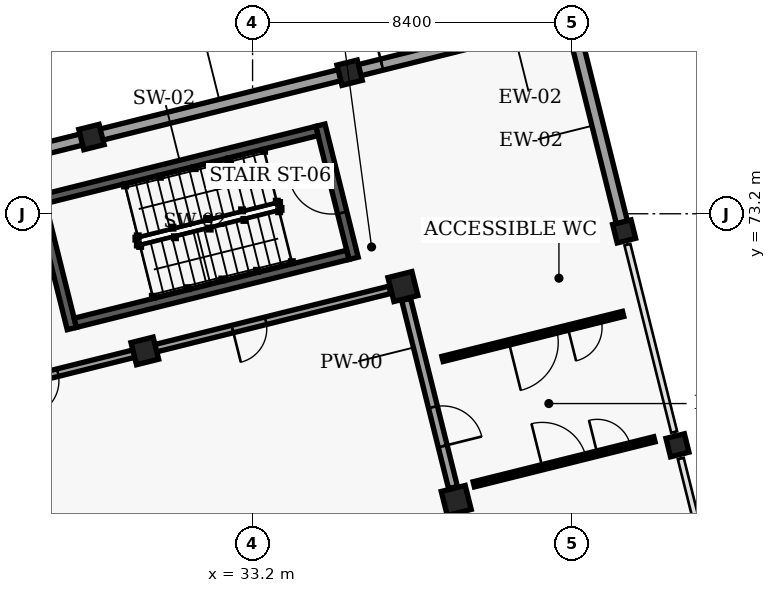
"""IFC4 building model, lengths in metres.
Left out: names, types, materials, properties, quantities, classifications, styles, units other than length and angle.
Written with IfcOpenShell. Run it as: python <this file> out.ifc"""

import sys

from ifc_helpers import new_model, si_unit, direction, frame, frame_2d, origin, origin_2d, place, context, subcontext, project, spatial, rectangle, extrude, element, fill, save


model = new_model("IFC4")
c1 = context("Model", 3, precision=1e-05, world=origin(), true_north=direction((0.0, 1.0)))
c2 = subcontext(c1, "Body", "Model", "MODEL_VIEW")
j1 = project(units=[si_unit("LENGTHUNIT", "METRE"), si_unit("PLANEANGLEUNIT", "RADIAN")], contexts=[c1])
p1 = place(None, origin())
s1 = spatial("IfcSite", under=j1, at=p1, CompositionType="ELEMENT")
p2 = place(p1, origin())
s2 = spatial("IfcBuilding", under=s1, at=p2, CompositionType="ELEMENT")
p3 = place(p2, origin())
s3 = spatial("IfcBuildingStorey", under=s2, at=p3, CompositionType="ELEMENT", Elevation=0.0)
for number, where, z_axis, x_axis in (
    (1, (38.559, 65.657, 0.0), (0.0, 0.0, 1.0), (0.97, 0.242, 0.0)),
    (2, (37.156, 71.285, 0.0), (0.0, 0.0, 1.0), (0.97, 0.242, 0.0)),
):
    element("IfcColumn", number, at=place(p3, frame(where, z_axis=z_axis, x_axis=x_axis)), inside=s3, PredefinedType="COLUMN", context=c2, shape_type="SweptSolid", body=[
        extrude(rectangle(XDim=0.65, YDim=0.65, at=origin_2d()), origin(), (0.0, 0.0, 1.0), 4.8),
    ])
for number, where, z_axis, x_axis in (
    (3, (44.381, 67.108, 0.0), (0.0, 0.0, 1.0), (0.97, 0.242, 0.0)),
    (4, (42.977, 72.736, 0.0), (0.0, 0.0, 1.0), (0.97, 0.242, 0.0)),
):
    element("IfcColumn", number, at=place(p3, frame(where, z_axis=z_axis, x_axis=x_axis)), inside=s3, PredefinedType="COLUMN", context=c2, shape_type="SweptSolid", body=[
        extrude(rectangle(XDim=0.5, YDim=0.5, at=origin_2d()), origin(), (0.0, 0.0, 1.0), 4.8),
    ])
p4 = place(p3, frame((30.364, 69.591, 0.0), z_axis=(0.0, 0.0, 1.0), x_axis=(0.970295726276, 0.2419218956, 0.0)))
e5 = element("IfcColumn", 5, at=p4, inside=s3, PredefinedType="COLUMN", context=c2, shape_type="SweptSolid", body=[
    extrude(rectangle(XDim=0.6, YDim=0.6, at=origin_2d()), origin(), (0.0, 0.0, 1.0), 4.8),
])
for number, where, z_axis, x_axis in (
    (6, (28.96, 75.219, 0.0), (0.0, 0.0, 1.0), (0.97, 0.242, 0.0)),
    (7, (35.753, 76.912, 0.0), (0.0, 0.0, 1.0), (0.97, 0.242, 0.0)),
):
    element("IfcColumn", number, at=place(p3, frame(where, z_axis=z_axis, x_axis=x_axis)), inside=s3, PredefinedType="COLUMN", context=c2, shape_type="SweptSolid", body=[
        extrude(rectangle(XDim=0.55, YDim=0.55, at=origin_2d()), origin(), (0.0, 0.0, 1.0), 4.8),
    ])
p5 = place(p3, frame((42.958, 72.814, 0.0), z_axis=(0.0, 0.0, 1.0), x_axis=(-0.242036480393, 0.970267149892, 0.0)))
e8 = element("IfcWall", 8, at=p5, inside=s3, PredefinedType="SOLIDWALL", context=c2, shape_type="SweptSolid", body=[
    extrude(rectangle(XDim=5.64, YDim=0.3, at=frame_2d((2.82, 0.0))), origin(), (0.0, 0.0, 1.0), 4.095),
])
p6 = place(p3, frame((22.265, 73.55, 0.0), z_axis=(0.0, 0.0, 1.0), x_axis=(0.970298579828, 0.24191045034, 0.0)))
e9 = element("IfcWall", 9, at=p6, inside=s3, PredefinedType="SOLIDWALL", context=c2, shape_type="SweptSolid", body=[
    extrude(rectangle(XDim=6.8, YDim=0.3, at=frame_2d((3.4, 0.0))), origin(), (0.0, 0.0, 1.0), 4.065),
])
p7 = place(p3, frame((29.058, 75.243, 0.0), z_axis=(0.0, 0.0, 1.0), x_axis=(0.970296478685, 0.241918877831, 0.0)))
e10 = element("IfcWall", 10, at=p7, inside=s3, PredefinedType="SOLIDWALL", context=c2, shape_type="SweptSolid", body=[
    extrude(rectangle(XDim=6.8, YDim=0.3, at=frame_2d((3.4, 0.0))), origin(), (0.0, 0.0, 1.0), 4.065),
])
p8 = place(p3, frame((35.85, 76.937, 0.0), z_axis=(0.0, 0.0, 1.0), x_axis=(0.97029090175, 0.241941244896, 0.0)))
e11 = element("IfcWall", 11, at=p8, inside=s3, PredefinedType="SOLIDWALL", context=c2, shape_type="SweptSolid", body=[
    extrude(rectangle(XDim=5.799, YDim=0.3, at=frame_2d((2.9, 0.0))), origin(), (0.0, 0.0, 1.0), 4.065),
])
p9 = place(p8, frame((0.775, 0.0, 0.0)))
e12 = element("IfcOpeningElement", 12, at=p9, cuts=e11, PredefinedType="OPENING", context=c2, shape_type="SweptSolid", body=[
    extrude(rectangle(XDim=2.05, YDim=2.32, at=frame_2d((1.025, 1.16))), frame((0.0, 0.16, 0.0), z_axis=(0.0, -1.0, 0.0), x_axis=(1.0, 0.0, 0.0)), (0.0, 0.0, 1.0), 0.32),
])
p10 = place(p3, frame((34.984, 75.531, 0.0), z_axis=(0.0, 0.0, 1.0), x_axis=(0.242090083699, -0.97025377679, 0.0)))
e13 = element("IfcWall", 13, at=p10, inside=s3, PredefinedType="SHEAR", context=c2, shape_type="SweptSolid", body=[
    extrude(rectangle(XDim=3.61, YDim=0.25, at=frame_2d((1.805, 0.0))), origin(), (0.0, 0.0, 1.0), 4.56),
])
p11 = place(p10, frame((1.235, 0.0, 0.0)))
e14 = element("IfcOpeningElement", 14, at=p11, cuts=e13, PredefinedType="OPENING", context=c2, shape_type="SweptSolid", body=[
    extrude(rectangle(XDim=1.14, YDim=2.15, at=frame_2d((0.57, 1.075))), frame((0.0, 0.135, 0.0), z_axis=(0.0, -1.0, 0.0), x_axis=(1.0, 0.0, 0.0)), (0.0, 0.0, 1.0), 0.27),
])
p12 = place(p3, frame((28.444, 70.18, 0.0), z_axis=(0.0, 0.0, 1.0), x_axis=(-0.241898912952, 0.970301456204, 0.0)))
e15 = element("IfcWall", 15, at=p12, inside=s3, PredefinedType="SHEAR", context=c2, shape_type="SweptSolid", body=[
    extrude(rectangle(XDim=3.609, YDim=0.25, at=frame_2d((1.805, 0.0))), origin(), (0.0, 0.0, 1.0), 4.56),
])
p13 = place(p3, frame((35.706, 72.119, 0.0), z_axis=(0.0, 0.0, 1.0), x_axis=(-0.970299691856, -0.241905989972, 0.0)))
e16 = element("IfcWall", 16, at=p13, inside=s3, PredefinedType="SHEAR", context=c2, shape_type="SweptSolid", body=[
    extrude(rectangle(XDim=7.391, YDim=0.25, at=frame_2d((3.695, 0.0))), origin(), (0.0, 0.0, 1.0), 4.56),
])
p14 = place(p3, frame((27.723, 73.591, 0.0), z_axis=(0.0, 0.0, 1.0), x_axis=(0.970291958031, 0.241937008705, 0.0)))
e17 = element("IfcWall", 17, at=p14, inside=s3, PredefinedType="SHEAR", context=c2, shape_type="SweptSolid", body=[
    extrude(rectangle(XDim=7.39, YDim=0.25, at=frame_2d((3.695, 0.0))), origin(), (0.0, 0.0, 1.0), 4.56),
])
p15 = place(p3, frame((41.28, 54.742, 0.0), z_axis=(0.0, 0.0, 1.0), x_axis=(-0.241866165603, 0.970309619625, 0.0)))
e18 = element("IfcWall", 18, at=p15, inside=s3, PredefinedType="PARTITIONING", context=c2, shape_type="SweptSolid", body=[
    extrude(rectangle(XDim=10.898, YDim=0.24, at=frame_2d((5.449, 0.0))), origin(), (0.0, 0.0, 1.0), 4.006),
])
p16 = place(p15, frame((3.539, 0.0, 0.0)))
e19 = element("IfcOpeningElement", 19, at=p16, cuts=e18, PredefinedType="OPENING", context=c2, shape_type="SweptSolid", body=[
    extrude(rectangle(XDim=1.12, YDim=2.16, at=frame_2d((0.56, 1.08))), frame((0.0, 0.13, 0.0), z_axis=(0.0, -1.0, 0.0), x_axis=(1.0, 0.0, 0.0)), (0.0, 0.0, 1.0), 0.26),
])
p17 = place(p3, frame((38.474, 65.997, 0.0), z_axis=(0.0, 0.0, 1.0), x_axis=(-0.241825856576, 0.970319666446, 0.0)))
e20 = element("IfcWall", 20, at=p17, inside=s3, PredefinedType="PARTITIONING", context=c2, shape_type="SweptSolid", body=[
    extrude(rectangle(XDim=5.099, YDim=0.24, at=frame_2d((2.55, 0.0))), origin(), (0.0, 0.0, 1.0), 3.845),
])
p18 = place(p17, frame((1.12, 0.0, 0.0)))
e21 = element("IfcOpeningElement", 21, at=p18, cuts=e20, PredefinedType="OPENING", context=c2, shape_type="SweptSolid", body=[
    extrude(rectangle(XDim=1.06, YDim=2.16, at=frame_2d((0.53, 1.08))), frame((0.0, 0.13, 0.0), z_axis=(0.0, -1.0, 0.0), x_axis=(1.0, 0.0, 0.0)), (0.0, 0.0, 1.0), 0.26),
])
p19 = place(p3, frame((17.119, 66.289, 0.0), z_axis=(0.0, 0.0, 1.0), x_axis=(0.970297233618, 0.241915849902, 0.0)))
e22 = element("IfcWall", 22, at=p19, inside=s3, PredefinedType="PARTITIONING", context=c2, shape_type="SweptSolid", body=[
    extrude(rectangle(XDim=20.3, YDim=0.2, at=frame_2d((10.15, 0.0))), origin(), (0.0, 0.0, 1.0), 3.845),
])
p20 = place(p19, frame((7.192, 0.0, 0.0)))
e23 = element("IfcOpeningElement", 23, at=p20, cuts=e22, PredefinedType="OPENING", context=c2, shape_type="SweptSolid", body=[
    extrude(rectangle(XDim=0.95, YDim=2.12, at=frame_2d((0.475, 1.06))), frame((0.0, 0.11, 0.0), z_axis=(0.0, -1.0, 0.0), x_axis=(1.0, 0.0, 0.0)), (0.0, 0.0, 1.0), 0.22),
])
p21 = place(p19, frame((10.373, 0.0, 0.0)))
e24 = element("IfcOpeningElement", 24, at=p21, cuts=e22, PredefinedType="OPENING", context=c2, shape_type="SweptSolid", body=[
    extrude(rectangle(XDim=0.92, YDim=2.1, at=frame_2d((0.46, 1.05))), frame((0.0, 0.11, 0.0), z_axis=(0.0, -1.0, 0.0), x_axis=(1.0, 0.0, 0.0)), (0.0, 0.0, 1.0), 0.22),
])
p22 = place(p19, frame((5.12, 0.0, 0.0)))
e25 = element("IfcOpeningElement", 25, at=p22, cuts=e22, PredefinedType="OPENING", context=c2, shape_type="SweptSolid", body=[
    extrude(rectangle(XDim=0.9, YDim=2.06, at=frame_2d((0.45, 1.03))), frame((0.0, 0.11, 0.0), z_axis=(0.0, -1.0, 0.0), x_axis=(1.0, 0.0, 0.0)), (0.0, 0.0, 1.0), 0.22),
])
p23 = place(p19, frame((16.03, 0.0, 0.0)))
e26 = element("IfcOpeningElement", 26, at=p23, cuts=e22, PredefinedType="OPENING", context=c2, shape_type="SweptSolid", body=[
    extrude(rectangle(XDim=0.9, YDim=2.06, at=frame_2d((0.45, 1.03))), frame((0.0, 0.11, 0.0), z_axis=(0.0, -1.0, 0.0), x_axis=(1.0, 0.0, 0.0)), (0.0, 0.0, 1.0), 0.22),
])
p24 = place(p3, frame((39.02, 66.081, 0.0), z_axis=(0.0, 0.0, 1.0), x_axis=(0.970306426655, 0.241878974681, 0.0)))
e27 = element("IfcWall", 27, at=p24, inside=s3, PredefinedType="PARTITIONING", context=c2, shape_type="SweptSolid", body=[
    extrude(rectangle(XDim=4.899, YDim=0.14, at=frame_2d((2.45, 0.0))), origin(), (0.0, 0.0, 1.0), 4.187),
])
p25 = place(p24, frame((1.86, 0.0, 0.0)))
e28 = element("IfcOpeningElement", 28, at=p25, cuts=e27, PredefinedType="OPENING", context=c2, shape_type="SweptSolid", body=[
    extrude(rectangle(XDim=1.18, YDim=2.18, at=frame_2d((0.59, 1.09))), frame((0.0, 0.08, 0.0), z_axis=(0.0, -1.0, 0.0), x_axis=(1.0, 0.0, 0.0)), (0.0, 0.0, 1.0), 0.16),
])
p26 = place(p24, frame((3.35, 0.0, 0.0)))
e29 = element("IfcOpeningElement", 29, at=p26, cuts=e27, PredefinedType="OPENING", context=c2, shape_type="SweptSolid", body=[
    extrude(rectangle(XDim=0.9, YDim=2.06, at=frame_2d((0.45, 1.03))), frame((0.0, 0.08, 0.0), z_axis=(0.0, -1.0, 0.0), x_axis=(1.0, 0.0, 0.0)), (0.0, 0.0, 1.0), 0.16),
])
p27 = place(p3, frame((38.198, 69.38, 0.0), z_axis=(0.0, 0.0, 1.0), x_axis=(0.970294761766, 0.241925764003, 0.0)))
e30 = element("IfcWall", 30, at=p27, inside=s3, PredefinedType="PARTITIONING", context=c2, shape_type="SweptSolid", body=[
    extrude(rectangle(XDim=4.898, YDim=0.14, at=frame_2d((2.449, 0.0))), origin(), (0.0, 0.0, 1.0), 4.187),
])
p28 = place(p27, frame((1.799, 0.0, 0.0)))
e31 = element("IfcOpeningElement", 31, at=p28, cuts=e30, PredefinedType="OPENING", context=c2, shape_type="SweptSolid", body=[
    extrude(rectangle(XDim=1.3, YDim=2.2, at=frame_2d((0.65, 1.1))), frame((0.0, 0.08, 0.0), z_axis=(0.0, -1.0, 0.0), x_axis=(1.0, 0.0, 0.0)), (0.0, 0.0, 1.0), 0.16),
])
p29 = place(p27, frame((3.399, 0.0, 0.0)))
e32 = element("IfcOpeningElement", 32, at=p29, cuts=e30, PredefinedType="OPENING", context=c2, shape_type="SweptSolid", body=[
    extrude(rectangle(XDim=0.9, YDim=2.06, at=frame_2d((0.45, 1.03))), frame((0.0, 0.08, 0.0), z_axis=(0.0, -1.0, 0.0), x_axis=(1.0, 0.0, 0.0)), (0.0, 0.0, 1.0), 0.16),
])
p30 = place(p11, origin())
e33 = element("IfcDoor", 33, at=p30, inside=s3, OperationType="SINGLE_SWING_RIGHT", PredefinedType="DOOR", context=c2, shape_type="SweptSolid", body=[
    extrude(rectangle(XDim=1.14, YDim=2.15, at=frame_2d((0.57, 1.075))), frame((0.0, 0.025, 0.0), z_axis=(0.0, -1.0, 0.0), x_axis=(1.0, 0.0, 0.0)), (0.0, 0.0, 1.0), 0.05),
])
fill(e14, e33)
p31 = place(p9, origin())
e34 = element("IfcDoor", 34, at=p31, inside=s3, OperationType="DOUBLE_DOOR_SINGLE_SWING", PredefinedType="GATE", context=c2, shape_type="SweptSolid", body=[
    extrude(rectangle(XDim=2.05, YDim=2.32, at=frame_2d((1.025, 1.16))), frame((0.0, 0.025, 0.0), z_axis=(0.0, -1.0, 0.0), x_axis=(1.0, 0.0, 0.0)), (0.0, 0.0, 1.0), 0.05),
])
fill(e12, e34)
p32 = place(p18, origin())
e35 = element("IfcDoor", 35, at=p32, inside=s3, OperationType="SINGLE_SWING_RIGHT", PredefinedType="DOOR", context=c2, shape_type="SweptSolid", body=[
    extrude(rectangle(XDim=1.06, YDim=2.16, at=frame_2d((0.53, 1.08))), frame((0.0, 0.025, 0.0), z_axis=(0.0, -1.0, 0.0), x_axis=(1.0, 0.0, 0.0)), (0.0, 0.0, 1.0), 0.05),
])
fill(e21, e35)
p33 = place(p21, origin())
e36 = element("IfcDoor", 36, at=p33, inside=s3, OperationType="SINGLE_SWING_RIGHT", PredefinedType="DOOR", context=c2, shape_type="SweptSolid", body=[
    extrude(rectangle(XDim=0.92, YDim=2.1, at=frame_2d((0.46, 1.05))), frame((0.0, 0.025, 0.0), z_axis=(0.0, -1.0, 0.0), x_axis=(1.0, 0.0, 0.0)), (0.0, 0.0, 1.0), 0.05),
])
fill(e24, e36)
p34 = place(p25, origin())
e37 = element("IfcDoor", 37, at=p34, inside=s3, OperationType="SINGLE_SWING_LEFT", PredefinedType="DOOR", context=c2, shape_type="SweptSolid", body=[
    extrude(rectangle(XDim=1.18, YDim=2.18, at=frame_2d((0.59, 1.09))), frame((0.0, 0.025, 0.0), z_axis=(0.0, -1.0, 0.0), x_axis=(1.0, 0.0, 0.0)), (0.0, 0.0, 1.0), 0.05),
])
fill(e28, e37)
p35 = place(p28, origin())
e38 = element("IfcDoor", 38, at=p35, inside=s3, OperationType="SINGLE_SWING_RIGHT", PredefinedType="DOOR", context=c2, shape_type="SweptSolid", body=[
    extrude(rectangle(XDim=1.3, YDim=2.2, at=frame_2d((0.65, 1.1))), frame((0.0, 0.025, 0.0), z_axis=(0.0, -1.0, 0.0), x_axis=(1.0, 0.0, 0.0)), (0.0, 0.0, 1.0), 0.05),
])
fill(e31, e38)
p36 = place(p26, origin())
e39 = element("IfcDoor", 39, at=p36, inside=s3, OperationType="SINGLE_SWING_LEFT", PredefinedType="DOOR", context=c2, shape_type="SweptSolid", body=[
    extrude(rectangle(XDim=0.9, YDim=2.06, at=frame_2d((0.45, 1.03))), frame((0.0, 0.025, 0.0), z_axis=(0.0, -1.0, 0.0), x_axis=(1.0, 0.0, 0.0)), (0.0, 0.0, 1.0), 0.05),
])
fill(e29, e39)
p37 = place(p29, origin())
e40 = element("IfcDoor", 40, at=p37, inside=s3, OperationType="SINGLE_SWING_RIGHT", PredefinedType="DOOR", context=c2, shape_type="SweptSolid", body=[
    extrude(rectangle(XDim=0.9, YDim=2.06, at=frame_2d((0.45, 1.03))), frame((0.0, 0.025, 0.0), z_axis=(0.0, -1.0, 0.0), x_axis=(1.0, 0.0, 0.0)), (0.0, 0.0, 1.0), 0.05),
])
fill(e32, e40)
p38 = place(p23, origin())
e41 = element("IfcDoor", 41, at=p38, inside=s3, OperationType="SINGLE_SWING_RIGHT", PredefinedType="DOOR", context=c2, shape_type="SweptSolid", body=[
    extrude(rectangle(XDim=0.9, YDim=2.06, at=frame_2d((0.45, 1.03))), frame((0.0, 0.025, 0.0), z_axis=(0.0, -1.0, 0.0), x_axis=(1.0, 0.0, 0.0)), (0.0, 0.0, 1.0), 0.05),
])
fill(e26, e41)
save(model, sys.argv[1])
